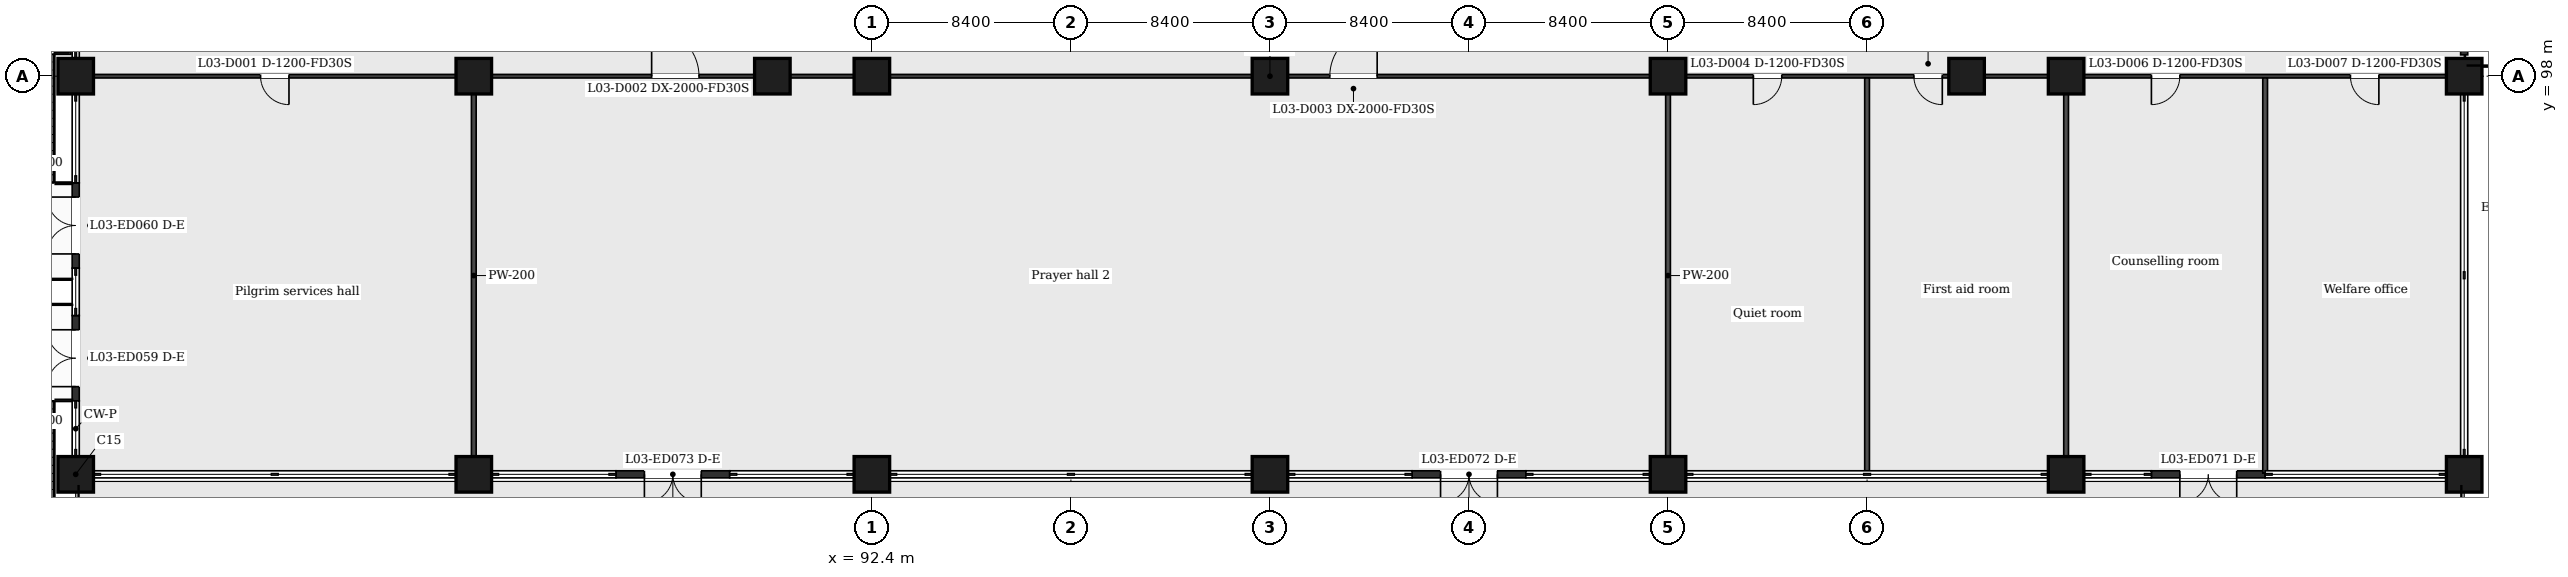
"""IFC4 building model, lengths in metres.
Left out: names, types, materials, properties, quantities, classifications, styles, units other than length and angle.
Written with IfcOpenShell. Run it as: python <this file> out.ifc"""

import sys

from ifc_helpers import new_model, si_unit, direction, frame, frame_2d, origin, origin_2d, place, context, subcontext, project, spatial, rectangle, extrude, element, fill, save


model = new_model("IFC4")
c1 = context("Model", 3, precision=1e-05, world=origin(), true_north=direction((0.0, 1.0)))
c2 = subcontext(c1, "Body", "Model", "MODEL_VIEW")
j1 = project(units=[si_unit("LENGTHUNIT", "METRE"), si_unit("PLANEANGLEUNIT", "RADIAN")], contexts=[c1])
p1 = place(None, origin())
s1 = spatial("IfcSite", under=j1, at=p1, CompositionType="ELEMENT")
p2 = place(p1, origin())
s2 = spatial("IfcBuilding", under=s1, at=p2, CompositionType="ELEMENT")
p3 = place(p2, frame((0.0, 0.0, 23.0)))
s3 = spatial("IfcBuildingStorey", under=s2, at=p3, CompositionType="ELEMENT", Elevation=23.0)
for number, where, z_axis, x_axis in (
    (1, (58.8, 81.2, 0.0), (0.0, 0.0, 1.0), (1.0, 0.0, 0.0)),
    (2, (75.6, 81.2, 0.0), (0.0, 0.0, 1.0), (1.0, 0.0, 0.0)),
    (3, (92.4, 81.2, 0.0), (0.0, 0.0, 1.0), (1.0, 0.0, 0.0)),
    (4, (109.2, 81.2, 0.0), (0.0, 0.0, 1.0), (1.0, 0.0, 0.0)),
    (5, (126.0, 81.2, 0.0), (0.0, 0.0, 1.0), (1.0, 0.0, 0.0)),
    (6, (142.8, 81.2, 0.0), (0.0, 0.0, 1.0), (1.0, 0.0, 0.0)),
    (7, (159.6, 81.2, 0.0), (0.0, 0.0, 1.0), (1.0, 0.0, 0.0)),
    (8, (58.8, 98.0, 0.0), (0.0, 0.0, 1.0), (1.0, 0.0, 0.0)),
    (9, (75.6, 98.0, 0.0), (0.0, 0.0, 1.0), (1.0, 0.0, 0.0)),
    (10, (88.2, 98.0, 0.0), (0.0, 0.0, 1.0), (1.0, 0.0, 0.0)),
    (11, (92.4, 98.0, 0.0), (0.0, 0.0, 1.0), (1.0, 0.0, 0.0)),
    (12, (109.2, 98.0, 0.0), (0.0, 0.0, 1.0), (1.0, 0.0, 0.0)),
    (13, (126.0, 98.0, 0.0), (0.0, 0.0, 1.0), (1.0, 0.0, 0.0)),
    (14, (138.6, 98.0, 0.0), (0.0, 0.0, 1.0), (1.0, 0.0, 0.0)),
    (15, (142.8, 98.0, 0.0), (0.0, 0.0, 1.0), (1.0, 0.0, 0.0)),
    (16, (159.6, 98.0, 0.0), (0.0, 0.0, 1.0), (1.0, 0.0, 0.0)),
):
    element("IfcColumn", number, at=place(p3, frame(where, z_axis=z_axis, x_axis=x_axis)), inside=s3, PredefinedType="COLUMN", context=c2, shape_type="SweptSolid", body=[
        extrude(rectangle(XDim=1.5, YDim=1.5, at=origin_2d()), origin(), (0.0, 0.0, 1.0), 6.0),
    ])
p4 = place(p3, frame((58.8, 84.3, 0.0), z_axis=(0.0, 0.0, 1.0), x_axis=(0.0, 1.0, 0.0)))
e17 = element("IfcWall", 17, at=p4, inside=s3, PredefinedType="SOLIDWALL", context=c2, shape_type="SweptSolid", body=[
    extrude(rectangle(XDim=3.6, YDim=0.3, at=frame_2d((1.8, 0.0))), origin(), (0.0, 0.0, 1.0), 5.1),
])
p5 = place(p4, frame((0.6, 0.0, 0.0)))
e18 = element("IfcOpeningElement", 18, at=p5, cuts=e17, PredefinedType="OPENING", context=c2, shape_type="SweptSolid", body=[
    extrude(rectangle(XDim=2.4, YDim=2.4, at=frame_2d((1.2, 1.2))), frame((0.0, 0.16, 0.0), z_axis=(0.0, -1.0, 0.0), x_axis=(1.0, 0.0, 0.0)), (0.0, 0.0, 1.0), 0.32),
])
p6 = place(p3, frame((58.8, 89.9, 0.0), z_axis=(0.0, 0.0, 1.0), x_axis=(0.0, 1.0, 0.0)))
e19 = element("IfcWall", 19, at=p6, inside=s3, PredefinedType="SOLIDWALL", context=c2, shape_type="SweptSolid", body=[
    extrude(rectangle(XDim=3.6, YDim=0.3, at=frame_2d((1.8, 0.0))), origin(), (0.0, 0.0, 1.0), 5.1),
])
p7 = place(p6, frame((0.6, 0.0, 0.0)))
e20 = element("IfcOpeningElement", 20, at=p7, cuts=e19, PredefinedType="OPENING", context=c2, shape_type="SweptSolid", body=[
    extrude(rectangle(XDim=2.4, YDim=2.4, at=frame_2d((1.2, 1.2))), frame((0.0, 0.16, 0.0), z_axis=(0.0, -1.0, 0.0), x_axis=(1.0, 0.0, 0.0)), (0.0, 0.0, 1.0), 0.32),
])
p8 = place(p3, frame((159.6, 102.5, 0.0), z_axis=(0.0, 0.0, 1.0), x_axis=(0.0, -1.0, 0.0)))
e21 = element("IfcWall", 21, at=p8, inside=s3, PredefinedType="SOLIDWALL", context=c2, shape_type="SweptSolid", body=[
    extrude(rectangle(XDim=3.6, YDim=0.3, at=frame_2d((1.8, 0.0))), origin(), (0.0, 0.0, 1.0), 5.1),
])
p9 = place(p8, frame((0.6, 0.0, 0.0)))
e22 = element("IfcOpeningElement", 22, at=p9, cuts=e21, PredefinedType="OPENING", context=c2, shape_type="SweptSolid", body=[
    extrude(rectangle(XDim=2.4, YDim=2.4, at=frame_2d((1.2, 1.2))), frame((0.0, 0.16, 0.0), z_axis=(0.0, -1.0, 0.0), x_axis=(1.0, 0.0, 0.0)), (0.0, 0.0, 1.0), 0.32),
])
p10 = place(p3, frame((151.2, 81.2, 0.0), z_axis=(0.0, 0.0, 1.0), x_axis=(-1.0, 0.0, 0.0)))
e23 = element("IfcWall", 23, at=p10, inside=s3, PredefinedType="SOLIDWALL", context=c2, shape_type="SweptSolid", body=[
    extrude(rectangle(XDim=4.8, YDim=0.3, at=frame_2d((2.4, 0.0))), origin(), (0.0, 0.0, 1.0), 5.1),
])
p11 = place(p10, frame((1.2, 0.0, 0.0)))
e24 = element("IfcOpeningElement", 24, at=p11, cuts=e23, PredefinedType="OPENING", context=c2, shape_type="SweptSolid", body=[
    extrude(rectangle(XDim=2.4, YDim=2.4, at=frame_2d((1.2, 1.2))), frame((0.0, 0.16, 0.0), z_axis=(0.0, -1.0, 0.0), x_axis=(1.0, 0.0, 0.0)), (0.0, 0.0, 1.0), 0.32),
])
p12 = place(p3, frame((120.0, 81.2, 0.0), z_axis=(0.0, 0.0, 1.0), x_axis=(-1.0, 0.0, 0.0)))
e25 = element("IfcWall", 25, at=p12, inside=s3, PredefinedType="SOLIDWALL", context=c2, shape_type="SweptSolid", body=[
    extrude(rectangle(XDim=4.8, YDim=0.3, at=frame_2d((2.4, 0.0))), origin(), (0.0, 0.0, 1.0), 5.1),
])
p13 = place(p12, frame((1.2, 0.0, 0.0)))
e26 = element("IfcOpeningElement", 26, at=p13, cuts=e25, PredefinedType="OPENING", context=c2, shape_type="SweptSolid", body=[
    extrude(rectangle(XDim=2.4, YDim=2.4, at=frame_2d((1.2, 1.2))), frame((0.0, 0.16, 0.0), z_axis=(0.0, -1.0, 0.0), x_axis=(1.0, 0.0, 0.0)), (0.0, 0.0, 1.0), 0.32),
])
p14 = place(p3, frame((86.4, 81.2, 0.0), z_axis=(0.0, 0.0, 1.0), x_axis=(-1.0, 0.0, 0.0)))
e27 = element("IfcWall", 27, at=p14, inside=s3, PredefinedType="SOLIDWALL", context=c2, shape_type="SweptSolid", body=[
    extrude(rectangle(XDim=4.8, YDim=0.3, at=frame_2d((2.4, 0.0))), origin(), (0.0, 0.0, 1.0), 5.1),
])
p15 = place(p14, frame((1.2, 0.0, 0.0)))
e28 = element("IfcOpeningElement", 28, at=p15, cuts=e27, PredefinedType="OPENING", context=c2, shape_type="SweptSolid", body=[
    extrude(rectangle(XDim=2.4, YDim=2.4, at=frame_2d((1.2, 1.2))), frame((0.0, 0.16, 0.0), z_axis=(0.0, -1.0, 0.0), x_axis=(1.0, 0.0, 0.0)), (0.0, 0.0, 1.0), 0.32),
])
p16 = place(p3, frame((58.85, 98.0, 0.0), z_axis=(0.0, 0.0, 1.0), x_axis=(1.0, 0.0, 0.0)))
e29 = element("IfcWall", 29, at=p16, inside=s3, PredefinedType="PARTITIONING", context=c2, shape_type="SweptSolid", body=[
    extrude(rectangle(XDim=100.7, YDim=0.15, at=frame_2d((50.35, 0.0))), origin(), (0.0, 0.0, 1.0), 5.5),
])
p17 = place(p16, frame((7.75, 0.0, 0.0)))
e30 = element("IfcOpeningElement", 30, at=p17, cuts=e29, PredefinedType="OPENING", context=c2, shape_type="SweptSolid", body=[
    extrude(rectangle(XDim=1.2, YDim=2.1, at=frame_2d((0.6, 1.05))), frame((0.0, 0.085, 0.0), z_axis=(0.0, -1.0, 0.0), x_axis=(1.0, 0.0, 0.0)), (0.0, 0.0, 1.0), 0.17),
])
p18 = place(p16, frame((24.255, 0.0, 0.0)))
e31 = element("IfcOpeningElement", 31, at=p18, cuts=e29, PredefinedType="OPENING", context=c2, shape_type="SweptSolid", body=[
    extrude(rectangle(XDim=2.0, YDim=2.1, at=frame_2d((1.0, 1.05))), frame((0.0, 0.085, 0.0), z_axis=(0.0, -1.0, 0.0), x_axis=(1.0, 0.0, 0.0)), (0.0, 0.0, 1.0), 0.17),
])
p19 = place(p16, frame((52.875, 0.0, 0.0)))
e32 = element("IfcOpeningElement", 32, at=p19, cuts=e29, PredefinedType="OPENING", context=c2, shape_type="SweptSolid", body=[
    extrude(rectangle(XDim=2.0, YDim=2.1, at=frame_2d((1.0, 1.05))), frame((0.0, 0.085, 0.0), z_axis=(0.0, -1.0, 0.0), x_axis=(1.0, 0.0, 0.0)), (0.0, 0.0, 1.0), 0.17),
])
p20 = place(p16, frame((70.75, 0.0, 0.0)))
e33 = element("IfcOpeningElement", 33, at=p20, cuts=e29, PredefinedType="OPENING", context=c2, shape_type="SweptSolid", body=[
    extrude(rectangle(XDim=1.2, YDim=2.1, at=frame_2d((0.6, 1.05))), frame((0.0, 0.085, 0.0), z_axis=(0.0, -1.0, 0.0), x_axis=(1.0, 0.0, 0.0)), (0.0, 0.0, 1.0), 0.17),
])
p21 = place(p16, frame((77.525, 0.0, 0.0)))
e34 = element("IfcOpeningElement", 34, at=p21, cuts=e29, PredefinedType="OPENING", context=c2, shape_type="SweptSolid", body=[
    extrude(rectangle(XDim=1.2, YDim=2.1, at=frame_2d((0.6, 1.05))), frame((0.0, 0.085, 0.0), z_axis=(0.0, -1.0, 0.0), x_axis=(1.0, 0.0, 0.0)), (0.0, 0.0, 1.0), 0.17),
])
p22 = place(p16, frame((87.55, 0.0, 0.0)))
e35 = element("IfcOpeningElement", 35, at=p22, cuts=e29, PredefinedType="OPENING", context=c2, shape_type="SweptSolid", body=[
    extrude(rectangle(XDim=1.2, YDim=2.1, at=frame_2d((0.6, 1.05))), frame((0.0, 0.085, 0.0), z_axis=(0.0, -1.0, 0.0), x_axis=(1.0, 0.0, 0.0)), (0.0, 0.0, 1.0), 0.17),
])
p23 = place(p16, frame((95.95, 0.0, 0.0)))
e36 = element("IfcOpeningElement", 36, at=p23, cuts=e29, PredefinedType="OPENING", context=c2, shape_type="SweptSolid", body=[
    extrude(rectangle(XDim=1.2, YDim=2.1, at=frame_2d((0.6, 1.05))), frame((0.0, 0.085, 0.0), z_axis=(0.0, -1.0, 0.0), x_axis=(1.0, 0.0, 0.0)), (0.0, 0.0, 1.0), 0.17),
])
p24 = place(p3, frame((75.6, 81.25, 0.0), z_axis=(0.0, 0.0, 1.0), x_axis=(0.0, 1.0, 0.0)))
e37 = element("IfcWall", 37, at=p24, inside=s3, PredefinedType="PARTITIONING", context=c2, shape_type="SweptSolid", body=[
    extrude(rectangle(XDim=16.675, YDim=0.2, at=frame_2d((8.337, 0.0))), origin(), (0.0, 0.0, 1.0), 5.1),
])
for number, where, z_axis, x_axis in (
    (38, (126.0, 81.25, 0.0), (0.0, 0.0, 1.0), (0.0, 1.0, 0.0)),
    (39, (134.4, 81.25, 0.0), (0.0, 0.0, 1.0), (0.0, 1.0, 0.0)),
    (40, (142.8, 81.25, 0.0), (0.0, 0.0, 1.0), (0.0, 1.0, 0.0)),
    (41, (151.2, 81.25, 0.0), (0.0, 0.0, 1.0), (0.0, 1.0, 0.0)),
):
    element("IfcWall", number, at=place(p3, frame(where, z_axis=z_axis, x_axis=x_axis)), inside=s3, PredefinedType="PARTITIONING", context=c2, shape_type="SweptSolid", body=[
        extrude(rectangle(XDim=16.675, YDim=0.2, at=frame_2d((8.337, 0.0))), origin(), (0.0, 0.0, 1.0), 5.5),
    ])
p25 = place(p5, origin())
e42 = element("IfcDoor", 42, at=p25, inside=s3, OperationType="DOUBLE_DOOR_DOUBLE_SWING", PredefinedType="DOOR", context=c2, shape_type="SweptSolid", body=[
    extrude(rectangle(XDim=2.4, YDim=2.4, at=frame_2d((1.2, 1.2))), frame((0.0, 0.025, 0.0), z_axis=(0.0, -1.0, 0.0), x_axis=(1.0, 0.0, 0.0)), (0.0, 0.0, 1.0), 0.05),
])
fill(e18, e42)
p26 = place(p7, origin())
e43 = element("IfcDoor", 43, at=p26, inside=s3, OperationType="DOUBLE_DOOR_DOUBLE_SWING", PredefinedType="DOOR", context=c2, shape_type="SweptSolid", body=[
    extrude(rectangle(XDim=2.4, YDim=2.4, at=frame_2d((1.2, 1.2))), frame((0.0, 0.025, 0.0), z_axis=(0.0, -1.0, 0.0), x_axis=(1.0, 0.0, 0.0)), (0.0, 0.0, 1.0), 0.05),
])
fill(e20, e43)
p27 = place(p11, origin())
e44 = element("IfcDoor", 44, at=p27, inside=s3, OperationType="DOUBLE_DOOR_DOUBLE_SWING", PredefinedType="DOOR", context=c2, shape_type="SweptSolid", body=[
    extrude(rectangle(XDim=2.4, YDim=2.4, at=frame_2d((1.2, 1.2))), frame((0.0, 0.025, 0.0), z_axis=(0.0, -1.0, 0.0), x_axis=(1.0, 0.0, 0.0)), (0.0, 0.0, 1.0), 0.05),
])
fill(e24, e44)
p28 = place(p13, origin())
e45 = element("IfcDoor", 45, at=p28, inside=s3, OperationType="DOUBLE_DOOR_DOUBLE_SWING", PredefinedType="DOOR", context=c2, shape_type="SweptSolid", body=[
    extrude(rectangle(XDim=2.4, YDim=2.4, at=frame_2d((1.2, 1.2))), frame((0.0, 0.025, 0.0), z_axis=(0.0, -1.0, 0.0), x_axis=(1.0, 0.0, 0.0)), (0.0, 0.0, 1.0), 0.05),
])
fill(e26, e45)
p29 = place(p15, origin())
e46 = element("IfcDoor", 46, at=p29, inside=s3, OperationType="DOUBLE_DOOR_DOUBLE_SWING", PredefinedType="DOOR", context=c2, shape_type="SweptSolid", body=[
    extrude(rectangle(XDim=2.4, YDim=2.4, at=frame_2d((1.2, 1.2))), frame((0.0, 0.025, 0.0), z_axis=(0.0, -1.0, 0.0), x_axis=(1.0, 0.0, 0.0)), (0.0, 0.0, 1.0), 0.05),
])
fill(e28, e46)
p30 = place(p17, origin())
e47 = element("IfcDoor", 47, at=p30, inside=s3, OperationType="SINGLE_SWING_RIGHT", PredefinedType="DOOR", context=c2, shape_type="SweptSolid", body=[
    extrude(rectangle(XDim=1.2, YDim=2.1, at=frame_2d((0.6, 1.05))), frame((0.0, 0.025, 0.0), z_axis=(0.0, -1.0, 0.0), x_axis=(1.0, 0.0, 0.0)), (0.0, 0.0, 1.0), 0.05),
])
fill(e30, e47)
p31 = place(p18, origin())
e48 = element("IfcDoor", 48, at=p31, inside=s3, OperationType="SINGLE_SWING_LEFT", PredefinedType="DOOR", context=c2, shape_type="SweptSolid", body=[
    extrude(rectangle(XDim=2.0, YDim=2.1, at=frame_2d((1.0, 1.05))), frame((0.0, 0.025, 0.0), z_axis=(0.0, -1.0, 0.0), x_axis=(1.0, 0.0, 0.0)), (0.0, 0.0, 1.0), 0.05),
])
fill(e31, e48)
p32 = place(p19, origin())
e49 = element("IfcDoor", 49, at=p32, inside=s3, OperationType="SINGLE_SWING_RIGHT", PredefinedType="DOOR", context=c2, shape_type="SweptSolid", body=[
    extrude(rectangle(XDim=2.0, YDim=2.1, at=frame_2d((1.0, 1.05))), frame((0.0, 0.025, 0.0), z_axis=(0.0, -1.0, 0.0), x_axis=(1.0, 0.0, 0.0)), (0.0, 0.0, 1.0), 0.05),
])
fill(e32, e49)
p33 = place(p20, origin())
e50 = element("IfcDoor", 50, at=p33, inside=s3, OperationType="SINGLE_SWING_LEFT", PredefinedType="DOOR", context=c2, shape_type="SweptSolid", body=[
    extrude(rectangle(XDim=1.2, YDim=2.1, at=frame_2d((0.6, 1.05))), frame((0.0, 0.025, 0.0), z_axis=(0.0, -1.0, 0.0), x_axis=(1.0, 0.0, 0.0)), (0.0, 0.0, 1.0), 0.05),
])
fill(e33, e50)
p34 = place(p21, origin())
e51 = element("IfcDoor", 51, at=p34, inside=s3, OperationType="SINGLE_SWING_RIGHT", PredefinedType="DOOR", context=c2, shape_type="SweptSolid", body=[
    extrude(rectangle(XDim=1.2, YDim=2.1, at=frame_2d((0.6, 1.05))), frame((0.0, 0.025, 0.0), z_axis=(0.0, -1.0, 0.0), x_axis=(1.0, 0.0, 0.0)), (0.0, 0.0, 1.0), 0.05),
])
fill(e34, e51)
p35 = place(p22, origin())
e52 = element("IfcDoor", 52, at=p35, inside=s3, OperationType="SINGLE_SWING_LEFT", PredefinedType="DOOR", context=c2, shape_type="SweptSolid", body=[
    extrude(rectangle(XDim=1.2, YDim=2.1, at=frame_2d((0.6, 1.05))), frame((0.0, 0.025, 0.0), z_axis=(0.0, -1.0, 0.0), x_axis=(1.0, 0.0, 0.0)), (0.0, 0.0, 1.0), 0.05),
])
fill(e35, e52)
p36 = place(p23, origin())
e53 = element("IfcDoor", 53, at=p36, inside=s3, OperationType="SINGLE_SWING_RIGHT", PredefinedType="DOOR", context=c2, shape_type="SweptSolid", body=[
    extrude(rectangle(XDim=1.2, YDim=2.1, at=frame_2d((0.6, 1.05))), frame((0.0, 0.025, 0.0), z_axis=(0.0, -1.0, 0.0), x_axis=(1.0, 0.0, 0.0)), (0.0, 0.0, 1.0), 0.05),
])
fill(e36, e53)
save(model, sys.argv[1])
